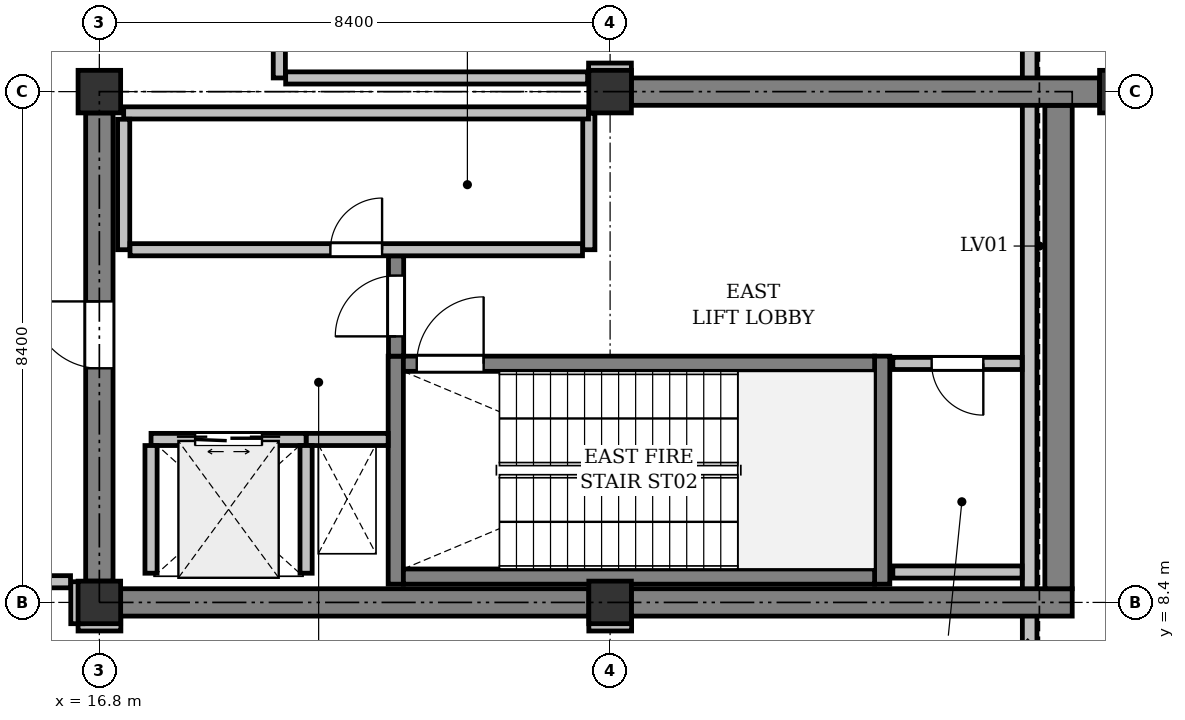
"""IFC4 building model, lengths in metres.
Left out: names, types, materials, properties, quantities, classifications, styles, units other than length and angle.
Written with IfcOpenShell. Run it as: python <this file> out.ifc"""

import sys

from ifc_helpers import new_model, si_unit, direction, frame, frame_2d, origin, origin_2d, place, context, subcontext, project, spatial, rectangle, extrude, element, fill, save


model = new_model("IFC4")
c1 = context("Model", 3, precision=1e-05, world=origin(), true_north=direction((0.0, 1.0)))
c2 = subcontext(c1, "Body", "Model", "MODEL_VIEW")
j1 = project(units=[si_unit("LENGTHUNIT", "METRE"), si_unit("PLANEANGLEUNIT", "RADIAN")], contexts=[c1])
p1 = place(None, origin())
s1 = spatial("IfcSite", under=j1, at=p1, CompositionType="ELEMENT")
p2 = place(p1, origin())
s2 = spatial("IfcBuilding", under=s1, at=p2, CompositionType="ELEMENT")
p3 = place(p2, frame((0.0, 0.0, 333.0)))
s3 = spatial("IfcBuildingStorey", under=s2, at=p3, CompositionType="ELEMENT", Elevation=333.0)
for number, where, z_axis, x_axis in (
    (1, (16.8, 8.4, 0.0), (0.0, 0.0, 1.0), (1.0, 0.0, 0.0)),
    (2, (16.8, 16.8, 0.0), (0.0, 0.0, 1.0), (1.0, 0.0, 0.0)),
    (3, (25.2, 8.4, 0.0), (0.0, 0.0, 1.0), (1.0, 0.0, 0.0)),
    (4, (25.2, 16.8, 0.0), (0.0, 0.0, 1.0), (1.0, 0.0, 0.0)),
    (5, (33.6, 16.8, 0.0), (0.0, 0.0, 1.0), (1.0, 0.0, 0.0)),
):
    element("IfcColumn", number, at=place(p3, frame(where, z_axis=z_axis, x_axis=x_axis)), inside=s3, PredefinedType="COLUMN", context=c2, shape_type="SweptSolid", body=[
        extrude(rectangle(XDim=0.7, YDim=0.7, at=origin_2d()), origin(), (0.0, 0.0, 1.0), 5.05),
    ])
p4 = place(p3, frame((32.1, 20.78, 0.0), z_axis=(0.0, 0.0, 1.0), x_axis=(0.0, -1.0, 0.0)))
e6 = element("IfcWall", 6, at=p4, inside=s3, PredefinedType="STANDARD", context=c2, shape_type="SweptSolid", body=[
    extrude(rectangle(XDim=13.233, YDim=0.24, at=frame_2d((6.617, 0.0))), origin(), (0.0, 0.0, 1.0), 4.691),
])
p5 = place(p3, frame((17.15, 8.4, 0.0), z_axis=(0.0, 0.0, 1.0), x_axis=(1.0, 0.0, 0.0)))
e7 = element("IfcWall", 7, at=p5, inside=s3, PredefinedType="SHEAR", context=c2, shape_type="SweptSolid", body=[
    extrude(rectangle(XDim=7.7, YDim=0.45, at=frame_2d((3.85, 0.0))), origin(), (0.0, 0.0, 1.0), 5.05),
])
p6 = place(p3, frame((25.55, 8.4, 0.0), z_axis=(0.0, 0.0, 1.0), x_axis=(1.0, 0.0, 0.0)))
e8 = element("IfcWall", 8, at=p6, inside=s3, PredefinedType="SHEAR", context=c2, shape_type="SweptSolid", body=[
    extrude(rectangle(XDim=7.25, YDim=0.45, at=frame_2d((3.625, 0.0))), origin(), (0.0, 0.0, 1.0), 5.05),
])
p7 = place(p3, frame((32.575, 8.625, 0.0), z_axis=(0.0, 0.0, 1.0), x_axis=(0.0, 1.0, 0.0)))
e9 = element("IfcWall", 9, at=p7, inside=s3, PredefinedType="SHEAR", context=c2, shape_type="SweptSolid", body=[
    extrude(rectangle(XDim=7.95, YDim=0.45, at=frame_2d((3.975, 0.0))), origin(), (0.0, 0.0, 1.0), 5.05),
])
p8 = place(p3, frame((16.8, 8.75, 0.0), z_axis=(0.0, 0.0, 1.0), x_axis=(0.0, 1.0, 0.0)))
e10 = element("IfcWall", 10, at=p8, inside=s3, PredefinedType="SHEAR", context=c2, shape_type="SweptSolid", body=[
    extrude(rectangle(XDim=7.7, YDim=0.45, at=frame_2d((3.85, 0.0))), origin(), (0.0, 0.0, 1.0), 5.05),
])
p9 = place(p8, frame((3.5, 0.0, 0.0)))
e11 = element("IfcOpeningElement", 11, at=p9, cuts=e10, PredefinedType="OPENING", context=c2, shape_type="SweptSolid", body=[
    extrude(rectangle(XDim=1.1, YDim=2.15, at=frame_2d((0.55, 1.075))), frame((0.0, 0.235, 0.0), z_axis=(0.0, -1.0, 0.0), x_axis=(1.0, 0.0, 0.0)), (0.0, 0.0, 1.0), 0.47),
])
p10 = place(p3, frame((25.55, 16.8, 0.0), z_axis=(0.0, 0.0, 1.0), x_axis=(1.0, 0.0, 0.0)))
e12 = element("IfcWall", 12, at=p10, inside=s3, PredefinedType="SHEAR", context=c2, shape_type="SweptSolid", body=[
    extrude(rectangle(XDim=7.7, YDim=0.45, at=frame_2d((3.85, 0.0))), origin(), (0.0, 0.0, 1.0), 5.05),
])
for number, where, z_axis, x_axis in (
    (13, (21.675, 8.7, 0.0), (0.0, 0.0, 1.0), (0.0, 1.0, 0.0)),
    (14, (29.675, 8.7, 0.0), (0.0, 0.0, 1.0), (0.0, 1.0, 0.0)),
):
    element("IfcWall", number, at=place(p3, frame(where, z_axis=z_axis, x_axis=x_axis)), inside=s3, PredefinedType="SHEAR", context=c2, shape_type="SweptSolid", body=[
        extrude(rectangle(XDim=3.75, YDim=0.25, at=frame_2d((1.875, 0.0))), origin(), (0.0, 0.0, 1.0), 5.05),
    ])
p11 = place(p3, frame((21.8, 8.825, 0.0), z_axis=(0.0, 0.0, 1.0), x_axis=(1.0, 0.0, 0.0)))
e15 = element("IfcWall", 15, at=p11, inside=s3, PredefinedType="SHEAR", context=c2, shape_type="SweptSolid", body=[
    extrude(rectangle(XDim=7.75, YDim=0.25, at=frame_2d((3.875, 0.0))), origin(), (0.0, 0.0, 1.0), 5.05),
])
p12 = place(p3, frame((21.8, 12.325, 0.0), z_axis=(0.0, 0.0, 1.0), x_axis=(1.0, 0.0, 0.0)))
e16 = element("IfcWall", 16, at=p12, inside=s3, PredefinedType="SHEAR", context=c2, shape_type="SweptSolid", body=[
    extrude(rectangle(XDim=7.75, YDim=0.25, at=frame_2d((3.875, 0.0))), origin(), (0.0, 0.0, 1.0), 5.05),
])
p13 = place(p12, frame((0.22, 0.0, 0.0)))
e17 = element("IfcOpeningElement", 17, at=p13, cuts=e16, PredefinedType="OPENING", context=c2, shape_type="SweptSolid", body=[
    extrude(rectangle(XDim=1.1, YDim=2.15, at=frame_2d((0.55, 1.075))), frame((0.0, 0.135, 0.0), z_axis=(0.0, -1.0, 0.0), x_axis=(1.0, 0.0, 0.0)), (0.0, 0.0, 1.0), 0.27),
])
p14 = place(p3, frame((20.2, 11.08, 0.0), z_axis=(0.0, 0.0, 1.0), x_axis=(1.0, 0.0, 0.0)))
e18 = element("IfcWall", 18, at=p14, inside=s3, PredefinedType="PARTITIONING", context=c2, shape_type="SweptSolid", body=[
    extrude(rectangle(XDim=1.35, YDim=0.2, at=frame_2d((0.675, 0.0))), origin(), (0.0, 0.0, 1.0), 5.05),
])
p15 = place(p3, frame((21.68, 12.45, 0.0), z_axis=(0.0, 0.0, 1.0), x_axis=(0.0, 1.0, 0.0)))
e19 = element("IfcWall", 19, at=p15, inside=s3, PredefinedType="SHEAR", context=c2, shape_type="SweptSolid", body=[
    extrude(rectangle(XDim=1.65, YDim=0.25, at=frame_2d((0.825, 0.0))), origin(), (0.0, 0.0, 1.0), 5.05),
])
p16 = place(p15, frame((0.325, 0.0, 0.0)))
e20 = element("IfcOpeningElement", 20, at=p16, cuts=e19, PredefinedType="OPENING", context=c2, shape_type="SweptSolid", body=[
    extrude(rectangle(XDim=1.0, YDim=2.15, at=frame_2d((0.5, 1.075))), frame((0.0, 0.135, 0.0), z_axis=(0.0, -1.0, 0.0), x_axis=(1.0, 0.0, 0.0)), (0.0, 0.0, 1.0), 0.27),
])
p17 = place(p3, frame((17.65, 11.08, 0.0), z_axis=(0.0, 0.0, 1.0), x_axis=(1.0, 0.0, 0.0)))
e21 = element("IfcWall", 21, at=p17, inside=s3, PredefinedType="PARTITIONING", context=c2, shape_type="SweptSolid", body=[
    extrude(rectangle(XDim=2.55, YDim=0.2, at=frame_2d((1.275, 0.0))), origin(), (0.0, 0.0, 1.0), 5.05),
])
p18 = place(p17, frame((0.725, 0.0, 0.0)))
e22 = element("IfcOpeningElement", 22, at=p18, cuts=e21, PredefinedType="OPENING", context=c2, shape_type="SweptSolid", body=[
    extrude(rectangle(XDim=1.1, YDim=2.2, at=frame_2d((0.55, 1.1))), frame((0.0, 0.11, 0.0), z_axis=(0.0, -1.0, 0.0), x_axis=(1.0, 0.0, 0.0)), (0.0, 0.0, 1.0), 0.22),
])
for number, where, z_axis, x_axis in (
    (23, (20.2, 8.88, 0.0), (0.0, 0.0, 1.0), (0.0, 1.0, 0.0)),
    (24, (17.65, 8.88, 0.0), (0.0, 0.0, 1.0), (0.0, 1.0, 0.0)),
):
    element("IfcWall", number, at=place(p3, frame(where, z_axis=z_axis, x_axis=x_axis)), inside=s3, PredefinedType="PARTITIONING", context=c2, shape_type="SweptSolid", body=[
        extrude(rectangle(XDim=2.1, YDim=0.2, at=frame_2d((1.05, 0.0))), origin(), (0.0, 0.0, 1.0), 5.05),
    ])
p19 = place(p3, frame((24.85, 14.2, 0.0), z_axis=(0.0, 0.0, 1.0), x_axis=(0.0, 1.0, 0.0)))
e25 = element("IfcWall", 25, at=p19, inside=s3, PredefinedType="PARTITIONING", context=c2, shape_type="SweptSolid", body=[
    extrude(rectangle(XDim=2.245, YDim=0.2, at=frame_2d((1.123, 0.0))), origin(), (0.0, 0.0, 1.0), 5.05),
])
p20 = place(p3, frame((24.845, 16.45, 0.0), z_axis=(0.0, 0.0, 1.0), x_axis=(-1.0, 0.0, 0.0)))
e26 = element("IfcWall", 26, at=p20, inside=s3, PredefinedType="PARTITIONING", context=c2, shape_type="SweptSolid", body=[
    extrude(rectangle(XDim=7.645, YDim=0.2, at=frame_2d((3.823, 0.0))), origin(), (0.0, 0.0, 1.0), 5.05),
])
p21 = place(p3, frame((17.2, 16.346, 0.0), z_axis=(0.0, 0.0, 1.0), x_axis=(0.0, -1.0, 0.0)))
e27 = element("IfcWall", 27, at=p21, inside=s3, PredefinedType="PARTITIONING", context=c2, shape_type="SweptSolid", body=[
    extrude(rectangle(XDim=2.146, YDim=0.2, at=frame_2d((1.073, 0.0))), origin(), (0.0, 0.0, 1.0), 5.05),
])
p22 = place(p3, frame((17.304, 14.2, 0.0), z_axis=(0.0, 0.0, 1.0), x_axis=(1.0, 0.0, 0.0)))
e28 = element("IfcWall", 28, at=p22, inside=s3, PredefinedType="PARTITIONING", context=c2, shape_type="SweptSolid", body=[
    extrude(rectangle(XDim=7.442, YDim=0.2, at=frame_2d((3.721, 0.0))), origin(), (0.0, 0.0, 1.0), 5.05),
])
p23 = place(p22, frame((3.296, 0.0, 0.0)))
e29 = element("IfcOpeningElement", 29, at=p23, cuts=e28, PredefinedType="OPENING", context=c2, shape_type="SweptSolid", body=[
    extrude(rectangle(XDim=0.85, YDim=2.15, at=frame_2d((0.425, 1.075))), frame((0.0, 0.11, 0.0), z_axis=(0.0, -1.0, 0.0), x_axis=(1.0, 0.0, 0.0)), (0.0, 0.0, 1.0), 0.22),
])
p24 = place(p3, frame((31.976, 12.33, 0.0), z_axis=(0.0, 0.0, 1.0), x_axis=(-1.0, 0.0, 0.0)))
e30 = element("IfcWall", 30, at=p24, inside=s3, PredefinedType="PARTITIONING", context=c2, shape_type="SweptSolid", body=[
    extrude(rectangle(XDim=2.126, YDim=0.2, at=frame_2d((1.063, 0.0))), origin(), (0.0, 0.0, 1.0), 5.05),
])
p25 = place(p24, frame((0.638, 0.0, 0.0)))
e31 = element("IfcOpeningElement", 31, at=p25, cuts=e30, PredefinedType="OPENING", context=c2, shape_type="SweptSolid", body=[
    extrude(rectangle(XDim=0.85, YDim=2.15, at=frame_2d((0.425, 1.075))), frame((0.0, 0.11, 0.0), z_axis=(0.0, -1.0, 0.0), x_axis=(1.0, 0.0, 0.0)), (0.0, 0.0, 1.0), 0.22),
])
p26 = place(p3, frame((29.85, 8.9, 0.0), z_axis=(0.0, 0.0, 1.0), x_axis=(1.0, 0.0, 0.0)))
e32 = element("IfcWall", 32, at=p26, inside=s3, PredefinedType="PARTITIONING", context=c2, shape_type="SweptSolid", body=[
    extrude(rectangle(XDim=2.126, YDim=0.2, at=frame_2d((1.063, 0.0))), origin(), (0.0, 0.0, 1.0), 5.05),
])
for number, where, z_axis, x_axis in (
    (33, (25.554, 8.031, 0.0), (0.0, 0.0, 1.0), (-1.0, -0.001, 0.0)),
    (34, (17.154, 8.031, 0.0), (0.0, 0.0, 1.0), (-1.0, -0.001, 0.0)),
):
    element("IfcWall", number, at=place(p3, frame(where, z_axis=z_axis, x_axis=x_axis)), inside=s3, PredefinedType="PARTITIONING", context=c2, shape_type="SweptSolid", body=[
        extrude(rectangle(XDim=0.704, YDim=0.2, at=frame_2d((0.352, 0.0))), origin(), (0.0, 0.0, 1.0), 5.05),
    ])
p27 = place(p3, frame((16.43, 8.05, 0.0), z_axis=(0.0, 0.0, 1.0), x_axis=(0.0, 1.0, 0.0)))
e35 = element("IfcWall", 35, at=p27, inside=s3, PredefinedType="PARTITIONING", context=c2, shape_type="SweptSolid", body=[
    extrude(rectangle(XDim=0.69, YDim=0.2, at=frame_2d((0.345, 0.0))), origin(), (0.0, 0.0, 1.0), 4.691),
])
p28 = place(p3, frame((16.326, 8.74, 0.0), z_axis=(0.0, 0.0, 1.0), x_axis=(-1.0, 0.0, 0.0)))
e36 = element("IfcWall", 36, at=p28, inside=s3, PredefinedType="PARTITIONING", context=c2, shape_type="SweptSolid", body=[
    extrude(rectangle(XDim=4.426, YDim=0.2, at=frame_2d((2.213, 0.0))), origin(), (0.0, 0.0, 1.0), 4.794),
])
p29 = place(p3, frame((19.76, 27.544, 0.0), z_axis=(0.0, 0.0, 1.0), x_axis=(0.0, -1.0, 0.0)))
e37 = element("IfcWall", 37, at=p29, inside=s3, PredefinedType="PARTITIONING", context=c2, shape_type="SweptSolid", body=[
    extrude(rectangle(XDim=10.519, YDim=0.2, at=frame_2d((5.259, 0.0))), origin(), (0.0, 0.0, 1.0), 5.05),
])
p30 = place(p29, frame((4.76, 0.0, 0.0)))
e38 = element("IfcOpeningElement", 38, at=p30, cuts=e37, PredefinedType="OPENING", context=c2, shape_type="SweptSolid", body=[
    extrude(rectangle(XDim=1.0, YDim=2.15, at=frame_2d((0.5, 1.075))), frame((0.0, 0.11, 0.0), z_axis=(0.0, -1.0, 0.0), x_axis=(1.0, 0.0, 0.0)), (0.0, 0.0, 1.0), 0.22),
])
p31 = place(p3, frame((19.864, 17.025, 0.0), z_axis=(0.0, 0.0, 1.0), x_axis=(1.0, 0.0, 0.0)))
e39 = element("IfcWall", 39, at=p31, inside=s3, PredefinedType="PARTITIONING", context=c2, shape_type="SweptSolid", body=[
    extrude(rectangle(XDim=4.966, YDim=0.2, at=frame_2d((2.483, 0.0))), origin(), (0.0, 0.0, 1.0), 4.691),
])
p32 = place(p3, frame((24.846, 17.17, 0.0), z_axis=(0.0, 0.0, 1.0), x_axis=(0.999999939844, 0.000346860888, 0.0)))
e40 = element("IfcWall", 40, at=p32, inside=s3, PredefinedType="PARTITIONING", context=c2, shape_type="SweptSolid", body=[
    extrude(rectangle(XDim=0.704, YDim=0.2, at=frame_2d((0.352, 0.0))), origin(), (0.0, 0.0, 1.0), 5.05),
])
p33 = place(p9, origin())
e41 = element("IfcDoor", 41, at=p33, inside=s3, OperationType="SINGLE_SWING_RIGHT", PredefinedType="DOOR", context=c2, shape_type="SweptSolid", body=[
    extrude(rectangle(XDim=1.1, YDim=2.15, at=frame_2d((0.55, 1.075))), frame((0.0, 0.025, 0.0), z_axis=(0.0, -1.0, 0.0), x_axis=(1.0, 0.0, 0.0)), (0.0, 0.0, 1.0), 0.05),
])
fill(e11, e41)
p34 = place(p13, origin())
e42 = element("IfcDoor", 42, at=p34, inside=s3, OperationType="SINGLE_SWING_RIGHT", PredefinedType="DOOR", context=c2, shape_type="SweptSolid", body=[
    extrude(rectangle(XDim=1.1, YDim=2.15, at=frame_2d((0.55, 1.075))), frame((0.0, 0.025, 0.0), z_axis=(0.0, -1.0, 0.0), x_axis=(1.0, 0.0, 0.0)), (0.0, 0.0, 1.0), 0.05),
])
fill(e17, e42)
p35 = place(p16, origin())
e43 = element("IfcDoor", 43, at=p35, inside=s3, OperationType="SINGLE_SWING_LEFT", PredefinedType="DOOR", context=c2, shape_type="SweptSolid", body=[
    extrude(rectangle(XDim=1.0, YDim=2.15, at=frame_2d((0.5, 1.075))), frame((0.0, 0.025, 0.0), z_axis=(0.0, -1.0, 0.0), x_axis=(1.0, 0.0, 0.0)), (0.0, 0.0, 1.0), 0.05),
])
fill(e20, e43)
p36 = place(p18, origin())
e44 = element("IfcDoor", 44, at=p36, inside=s3, OperationType="DOUBLE_DOOR_SLIDING", PredefinedType="DOOR", context=c2, shape_type="SweptSolid", body=[
    extrude(rectangle(XDim=1.1, YDim=2.2, at=frame_2d((0.55, 1.1))), frame((0.0, 0.025, 0.0), z_axis=(0.0, -1.0, 0.0), x_axis=(1.0, 0.0, 0.0)), (0.0, 0.0, 1.0), 0.05),
])
fill(e22, e44)
p37 = place(p23, origin())
e45 = element("IfcDoor", 45, at=p37, inside=s3, OperationType="SINGLE_SWING_RIGHT", PredefinedType="DOOR", context=c2, shape_type="SweptSolid", body=[
    extrude(rectangle(XDim=0.85, YDim=2.15, at=frame_2d((0.425, 1.075))), frame((0.0, 0.025, 0.0), z_axis=(0.0, -1.0, 0.0), x_axis=(1.0, 0.0, 0.0)), (0.0, 0.0, 1.0), 0.05),
])
fill(e29, e45)
p38 = place(p25, origin())
e46 = element("IfcDoor", 46, at=p38, inside=s3, OperationType="SINGLE_SWING_LEFT", PredefinedType="DOOR", context=c2, shape_type="SweptSolid", body=[
    extrude(rectangle(XDim=0.85, YDim=2.15, at=frame_2d((0.425, 1.075))), frame((0.0, 0.025, 0.0), z_axis=(0.0, -1.0, 0.0), x_axis=(1.0, 0.0, 0.0)), (0.0, 0.0, 1.0), 0.05),
])
fill(e31, e46)
save(model, sys.argv[1])
